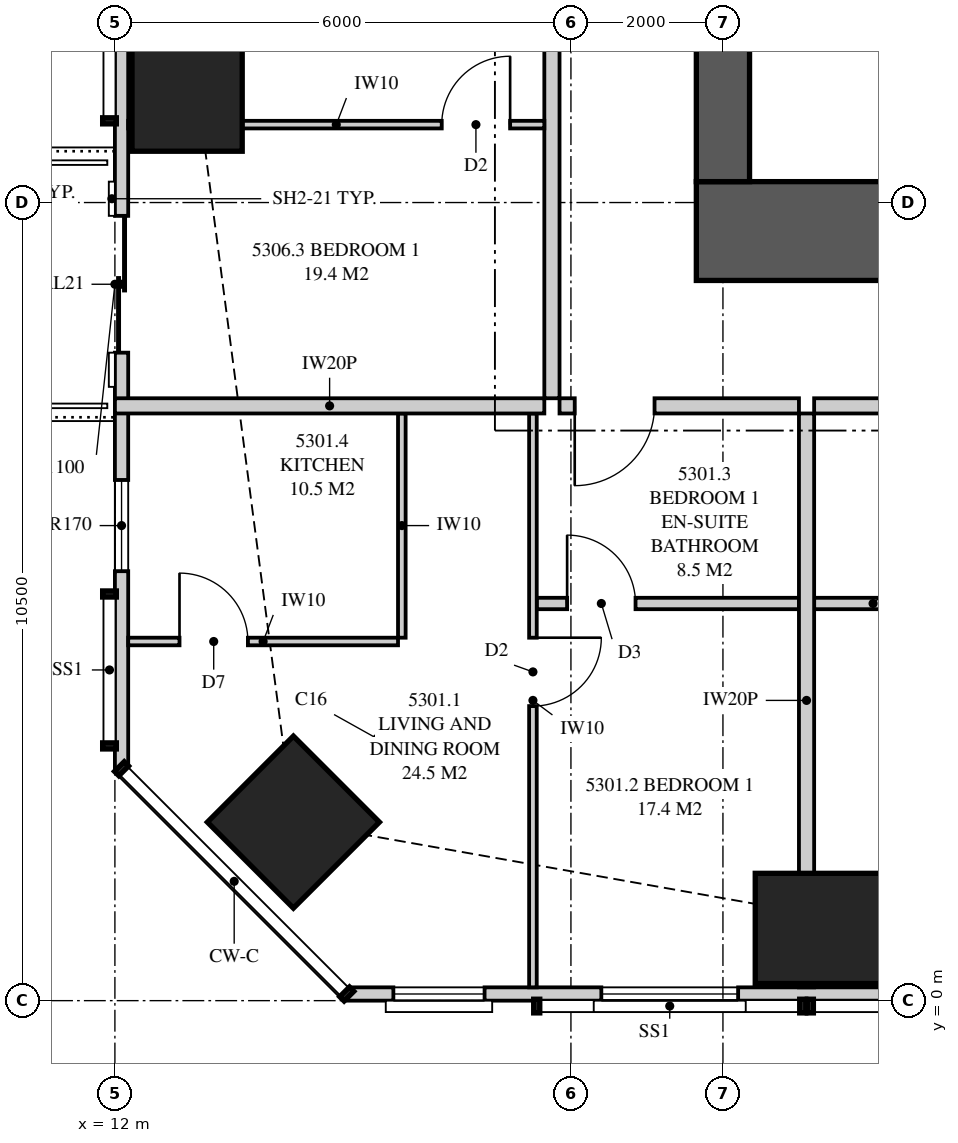
"""IFC4 building model, lengths in metres.
Left out: names, types, materials, properties, quantities, classifications, styles, units other than length and angle.
Written with IfcOpenShell. Run it as: python <this file> out.ifc"""

import sys

from ifc_helpers import new_model, si_unit, direction, frame, frame_2d, origin, origin_2d, place, context, subcontext, project, spatial, polyline, rectangle, outline, extrude, element, fill, save


model = new_model("IFC4")
c1 = context("Model", 3, precision=1e-05, world=origin(), true_north=direction((0.0, 1.0)))
c2 = subcontext(c1, "Body", "Model", "MODEL_VIEW")
j1 = project(units=[si_unit("LENGTHUNIT", "METRE"), si_unit("PLANEANGLEUNIT", "RADIAN")], contexts=[c1])
p1 = place(None, origin())
s1 = spatial("IfcSite", under=j1, at=p1, CompositionType="ELEMENT")
p2 = place(p1, origin())
s2 = spatial("IfcBuilding", under=s1, at=p2, CompositionType="ELEMENT")
p3 = place(p2, frame((0.0, 0.0, 194.55)))
s3 = spatial("IfcBuildingStorey", under=s2, at=p3, CompositionType="ELEMENT", Elevation=194.55)
p4 = place(p3, frame((14.348, 2.348, 0.0), z_axis=(0.0, 0.0, 1.0), x_axis=(0.707106781187, 0.707106781187, 0.0)))
e1 = element("IfcColumn", 1, at=p4, inside=s3, PredefinedType="COLUMN", context=c2, shape_type="SweptSolid", body=[
    extrude(rectangle(XDim=1.6, YDim=1.6, at=origin_2d()), origin(), (0.0, 0.0, 1.0), 3.35),
])
for number, where, z_axis, x_axis in (
    (2, (22.25, 0.95, 0.0), (0.0, 0.0, 1.0), (0.0, 1.0, 0.0)),
    (3, (12.95, 13.0, 0.0), (0.0, 0.0, 1.0), (1.0, 0.0, 0.0)),
):
    element("IfcColumn", number, at=place(p3, frame(where, z_axis=z_axis, x_axis=x_axis)), inside=s3, PredefinedType="COLUMN", context=c2, shape_type="SweptSolid", body=[
        extrude(rectangle(XDim=1.45, YDim=3.65, at=origin_2d()), origin(), (0.0, 0.0, 1.0), 3.35),
    ])
p5 = place(p3, frame((19.65, 10.125, 0.0), z_axis=(0.0, 0.0, 1.0), x_axis=(1.0, 0.0, 0.0)))
e4 = element("IfcWall", 4, at=p5, inside=s3, PredefinedType="SHEAR", context=c2, shape_type="SweptSolid", body=[
    extrude(rectangle(XDim=6.35, YDim=1.3, at=frame_2d((3.175, 0.0))), origin(), (0.0, 0.0, 1.0), 3.35),
])
p6 = place(p5, frame((4.775, 0.0, 0.0)))
e5 = element("IfcOpeningElement", 5, at=p6, cuts=e4, PredefinedType="OPENING", context=c2, shape_type="SweptSolid", body=[
    extrude(rectangle(XDim=0.75, YDim=2.1, at=frame_2d((0.375, 1.05))), frame((0.0, 0.66, 0.0), z_axis=(0.0, -1.0, 0.0), x_axis=(1.0, 0.0, 0.0)), (0.0, 0.0, 1.0), 1.32),
])
p7 = place(p3, frame((20.0, 13.0, 0.0), z_axis=(0.0, 0.0, 1.0), x_axis=(0.0, -1.0, 0.0)))
e6 = element("IfcWall", 6, at=p7, inside=s3, PredefinedType="SHEAR", context=c2, shape_type="SweptSolid", body=[
    extrude(rectangle(XDim=2.225, YDim=0.7, at=frame_2d((1.113, 0.0))), origin(), (0.0, 0.0, 1.0), 3.35),
])
p8 = place(p3, frame((15.051, 0.087, 0.0), z_axis=(0.0, 0.0, 1.0), x_axis=(1.0, 0.0, 0.0)))
e7 = element("IfcWall", 7, at=p8, inside=s3, PredefinedType="SOLIDWALL", context=c2, shape_type="SweptSolid", body=[
    extrude(outline(polyline([(0.0, 0.0), (34.897, 0.0), (34.897, 3.11), (27.91, 3.11), (27.91, 2.15), (27.836, 2.15), (27.836, 3.11), (27.699, 3.11), (27.699, 2.15), (7.199, 2.15), (7.199, 3.11), (7.062, 3.11), (7.062, 2.15), (6.987, 2.15), (6.987, 3.11), (0.0, 3.11), (0.0, 0.0)])), frame((0.0, 0.087, 0.0), z_axis=(0.0, -1.0, 0.0), x_axis=(1.0, 0.0, 0.0)), (0.0, 0.0, 1.0), 0.175),
])
p9 = place(p8, frame((0.613, 0.0, 0.4)))
e8 = element("IfcOpeningElement", 8, at=p9, cuts=e7, PredefinedType="OPENING", context=c2, shape_type="SweptSolid", body=[
    extrude(rectangle(XDim=1.2, YDim=1.7, at=frame_2d((0.6, 0.85))), frame((0.0, 0.097, 0.0), z_axis=(0.0, -1.0, 0.0), x_axis=(1.0, 0.0, 0.0)), (0.0, 0.0, 1.0), 0.195),
])
p10 = place(p8, frame((3.349, 0.0, 0.4)))
e9 = element("IfcOpeningElement", 9, at=p10, cuts=e7, PredefinedType="OPENING", context=c2, shape_type="SweptSolid", body=[
    extrude(rectangle(XDim=1.8, YDim=1.7, at=frame_2d((0.9, 0.85))), frame((0.0, 0.097, 0.0), z_axis=(0.0, -1.0, 0.0), x_axis=(1.0, 0.0, 0.0)), (0.0, 0.0, 1.0), 0.195),
])
p11 = place(p8, frame((9.13, 0.0, 0.4)))
e10 = element("IfcOpeningElement", 10, at=p11, cuts=e7, PredefinedType="OPENING", context=c2, shape_type="SweptSolid", body=[
    extrude(rectangle(XDim=1.8, YDim=1.7, at=frame_2d((0.9, 0.85))), frame((0.0, 0.097, 0.0), z_axis=(0.0, -1.0, 0.0), x_axis=(1.0, 0.0, 0.0)), (0.0, 0.0, 1.0), 0.195),
])
p12 = place(p8, frame((13.561, 0.0, 0.0)))
e11 = element("IfcOpeningElement", 11, at=p12, cuts=e7, PredefinedType="OPENING", context=c2, shape_type="SweptSolid", body=[
    extrude(rectangle(XDim=1.8, YDim=2.1, at=frame_2d((0.9, 1.05))), frame((0.0, 0.097, 0.0), z_axis=(0.0, -1.0, 0.0), x_axis=(1.0, 0.0, 0.0)), (0.0, 0.0, 1.0), 0.195),
])
p13 = place(p8, frame((11.799, 0.0, 0.4)))
e12 = element("IfcOpeningElement", 12, at=p13, cuts=e7, PredefinedType="OPENING", context=c2, shape_type="SweptSolid", body=[
    extrude(rectangle(XDim=1.2, YDim=1.7, at=frame_2d((0.6, 0.85))), frame((0.0, 0.097, 0.0), z_axis=(0.0, -1.0, 0.0), x_axis=(1.0, 0.0, 0.0)), (0.0, 0.0, 1.0), 0.195),
])
p14 = place(p8, frame((19.949, 0.0, 0.4)))
e13 = element("IfcOpeningElement", 13, at=p14, cuts=e7, PredefinedType="OPENING", context=c2, shape_type="SweptSolid", body=[
    extrude(rectangle(XDim=1.8, YDim=1.7, at=frame_2d((0.9, 0.85))), frame((0.0, 0.097, 0.0), z_axis=(0.0, -1.0, 0.0), x_axis=(1.0, 0.0, 0.0)), (0.0, 0.0, 1.0), 0.195),
])
p15 = place(p8, frame((23.549, 0.0, 0.4)))
e14 = element("IfcOpeningElement", 14, at=p15, cuts=e7, PredefinedType="OPENING", context=c2, shape_type="SweptSolid", body=[
    extrude(rectangle(XDim=1.8, YDim=1.7, at=frame_2d((0.9, 0.85))), frame((0.0, 0.097, 0.0), z_axis=(0.0, -1.0, 0.0), x_axis=(1.0, 0.0, 0.0)), (0.0, 0.0, 1.0), 0.195),
])
p16 = place(p8, frame((29.73, 0.0, 0.4)))
e15 = element("IfcOpeningElement", 15, at=p16, cuts=e7, PredefinedType="OPENING", context=c2, shape_type="SweptSolid", body=[
    extrude(rectangle(XDim=2.4, YDim=1.7, at=frame_2d((1.2, 0.85))), frame((0.0, 0.097, 0.0), z_axis=(0.0, -1.0, 0.0), x_axis=(1.0, 0.0, 0.0)), (0.0, 0.0, 1.0), 0.195),
])
p17 = place(p3, frame((12.087, 32.949, 0.0), z_axis=(0.0, 0.0, 1.0), x_axis=(0.0, -1.0, 0.0)))
e16 = element("IfcWall", 16, at=p17, inside=s3, PredefinedType="SOLIDWALL", context=c2, shape_type="SweptSolid", body=[
    extrude(outline(polyline([(0.0, 0.0), (29.897, 0.0), (29.897, 3.11), (20.191, 3.11), (20.191, 2.15), (20.051, 2.15), (20.051, 3.11), (19.949, 3.11), (19.949, 2.15), (7.949, 2.15), (7.949, 3.11), (7.823, 3.11), (7.823, 2.15), (7.73, 2.15), (7.73, 3.11), (0.0, 3.11), (0.0, 0.0)])), frame((0.0, 0.087, 0.0), z_axis=(0.0, -1.0, 0.0), x_axis=(1.0, 0.0, 0.0)), (0.0, 0.0, 1.0), 0.175),
])
p18 = place(p17, frame((1.226, 0.0, 0.4)))
e17 = element("IfcOpeningElement", 17, at=p18, cuts=e16, PredefinedType="OPENING", context=c2, shape_type="SweptSolid", body=[
    extrude(rectangle(XDim=1.8, YDim=1.7, at=frame_2d((0.9, 0.85))), frame((0.0, 0.097, 0.0), z_axis=(0.0, -1.0, 0.0), x_axis=(1.0, 0.0, 0.0)), (0.0, 0.0, 1.0), 0.195),
])
p19 = place(p17, frame((9.899, 0.0, 0.4)))
e18 = element("IfcOpeningElement", 18, at=p19, cuts=e16, PredefinedType="OPENING", context=c2, shape_type="SweptSolid", body=[
    extrude(rectangle(XDim=1.8, YDim=1.7, at=frame_2d((0.9, 0.85))), frame((0.0, 0.097, 0.0), z_axis=(0.0, -1.0, 0.0), x_axis=(1.0, 0.0, 0.0)), (0.0, 0.0, 1.0), 0.195),
])
p20 = place(p17, frame((13.024, 0.0, 0.4)))
e19 = element("IfcOpeningElement", 19, at=p20, cuts=e16, PredefinedType="OPENING", context=c2, shape_type="SweptSolid", body=[
    extrude(rectangle(XDim=1.8, YDim=1.7, at=frame_2d((0.9, 0.85))), frame((0.0, 0.097, 0.0), z_axis=(0.0, -1.0, 0.0), x_axis=(1.0, 0.0, 0.0)), (0.0, 0.0, 1.0), 0.195),
])
p21 = place(p17, frame((16.201, 0.0, 0.4)))
e20 = element("IfcOpeningElement", 20, at=p21, cuts=e16, PredefinedType="OPENING", context=c2, shape_type="SweptSolid", body=[
    extrude(rectangle(XDim=1.8, YDim=1.7, at=frame_2d((0.9, 0.85))), frame((0.0, 0.097, 0.0), z_axis=(0.0, -1.0, 0.0), x_axis=(1.0, 0.0, 0.0)), (0.0, 0.0, 1.0), 0.195),
])
p22 = place(p17, frame((22.624, 0.0, 0.0)))
e21 = element("IfcOpeningElement", 21, at=p22, cuts=e16, PredefinedType="OPENING", context=c2, shape_type="SweptSolid", body=[
    extrude(rectangle(XDim=1.8, YDim=2.1, at=frame_2d((0.9, 1.05))), frame((0.0, 0.097, 0.0), z_axis=(0.0, -1.0, 0.0), x_axis=(1.0, 0.0, 0.0)), (0.0, 0.0, 1.0), 0.195),
])
p23 = place(p17, frame((26.099, 0.0, 0.4)))
e22 = element("IfcOpeningElement", 22, at=p23, cuts=e16, PredefinedType="OPENING", context=c2, shape_type="SweptSolid", body=[
    extrude(rectangle(XDim=1.2, YDim=1.7, at=frame_2d((0.6, 0.85))), frame((0.0, 0.097, 0.0), z_axis=(0.0, -1.0, 0.0), x_axis=(1.0, 0.0, 0.0)), (0.0, 0.0, 1.0), 0.195),
])
p24 = place(p3, frame((21.1, 0.175, 0.0), z_axis=(0.0, 0.0, 1.0), x_axis=(0.0, 1.0, 0.0)))
e23 = element("IfcWall", 23, at=p24, inside=s3, PredefinedType="PARTITIONING", context=c2, shape_type="SweptSolid", body=[
    extrude(outline(polyline([(0.054, 3.11), (0.0, 3.11), (0.0, 0.0), (0.529, 0.0), (0.529, 0.362), (1.021, 0.362), (1.021, 0.0), (7.55, 0.0), (7.55, 3.11), (1.903, 3.11), (1.903, 2.15), (1.021, 2.15), (1.021, 1.788), (0.529, 1.788), (0.529, 2.15), (0.054, 2.15), (0.054, 3.11)])), frame((0.0, 0.1, 0.0), z_axis=(0.0, -1.0, 0.0), x_axis=(1.0, 0.0, 0.0)), (0.0, 0.0, 1.0), 0.2),
])
p25 = place(p3, frame((17.85, 7.825, 0.0), z_axis=(0.0, 0.0, 1.0), x_axis=(1.0, 0.0, 0.0)))
e24 = element("IfcWall", 24, at=p25, inside=s3, PredefinedType="PARTITIONING", context=c2, shape_type="SweptSolid", body=[
    extrude(rectangle(XDim=3.15, YDim=0.2, at=frame_2d((1.575, 0.0))), origin(), (0.0, 0.0, 1.0), 3.11),
])
p26 = place(p25, frame((0.2, 0.0, 0.0)))
e25 = element("IfcOpeningElement", 25, at=p26, cuts=e24, PredefinedType="OPENING", context=c2, shape_type="SweptSolid", body=[
    extrude(rectangle(XDim=1.05, YDim=2.2, at=frame_2d((0.525, 1.1))), frame((0.0, 0.11, 0.0), z_axis=(0.0, -1.0, 0.0), x_axis=(1.0, 0.0, 0.0)), (0.0, 0.0, 1.0), 0.22),
])
p27 = place(p3, frame((17.5, 0.175, 0.0), z_axis=(0.0, 0.0, 1.0), x_axis=(0.0, 1.0, 0.0)))
e26 = element("IfcWall", 26, at=p27, inside=s3, PredefinedType="PARTITIONING", context=c2, shape_type="SweptSolid", body=[
    extrude(outline(polyline([(0.0, 0.0), (7.55, 0.0), (7.55, 3.11), (2.489, 3.11), (2.489, 2.15), (0.742, 2.15), (0.742, 3.11), (0.0, 3.11), (0.0, 0.0)])), frame((0.0, 0.05, 0.0), z_axis=(0.0, -1.0, 0.0), x_axis=(1.0, 0.0, 0.0)), (0.0, 0.0, 1.0), 0.1),
])
p28 = place(p27, frame((3.7, 0.0, 0.0)))
e27 = element("IfcOpeningElement", 27, at=p28, cuts=e26, PredefinedType="OPENING", context=c2, shape_type="SweptSolid", body=[
    extrude(rectangle(XDim=0.9, YDim=2.1, at=frame_2d((0.45, 1.05))), frame((0.0, 0.06, 0.0), z_axis=(0.0, -1.0, 0.0), x_axis=(1.0, 0.0, 0.0)), (0.0, 0.0, 1.0), 0.12),
])
p29 = place(p3, frame((17.55, 5.225, 0.0), z_axis=(0.0, 0.0, 1.0), x_axis=(1.0, 0.0, 0.0)))
e28 = element("IfcWall", 28, at=p29, inside=s3, PredefinedType="PLUMBINGWALL", context=c2, shape_type="SweptSolid", body=[
    extrude(rectangle(XDim=3.45, YDim=0.15, at=frame_2d((1.725, 0.0))), origin(), (0.0, 0.0, 1.0), 3.11),
])
p30 = place(p29, frame((0.4, 0.0, 0.0)))
e29 = element("IfcOpeningElement", 29, at=p30, cuts=e28, PredefinedType="OPENING", context=c2, shape_type="SweptSolid", body=[
    extrude(rectangle(XDim=0.9, YDim=2.1, at=frame_2d((0.45, 1.05))), frame((0.0, 0.085, 0.0), z_axis=(0.0, -1.0, 0.0), x_axis=(1.0, 0.0, 0.0)), (0.0, 0.0, 1.0), 0.17),
])
p31 = place(p3, frame((12.175, 4.725, 0.0), z_axis=(0.0, 0.0, 1.0), x_axis=(1.0, 0.0, 0.0)))
e30 = element("IfcWall", 30, at=p31, inside=s3, PredefinedType="PARTITIONING", context=c2, shape_type="SweptSolid", body=[
    extrude(outline(polyline([(0.0, 0.0), (3.55, 0.0), (3.55, 3.11), (2.729, 3.11), (2.729, 2.15), (0.994, 2.15), (0.994, 3.11), (0.0, 3.11), (0.0, 0.0)])), frame((0.0, 0.05, 0.0), z_axis=(0.0, -1.0, 0.0), x_axis=(1.0, 0.0, 0.0)), (0.0, 0.0, 1.0), 0.1),
])
p32 = place(p31, frame((0.675, 0.0, 0.0)))
e31 = element("IfcOpeningElement", 31, at=p32, cuts=e30, PredefinedType="OPENING", context=c2, shape_type="SweptSolid", body=[
    extrude(rectangle(XDim=0.9, YDim=2.1, at=frame_2d((0.45, 1.05))), frame((0.0, 0.06, 0.0), z_axis=(0.0, -1.0, 0.0), x_axis=(1.0, 0.0, 0.0)), (0.0, 0.0, 1.0), 0.12),
])
p33 = place(p3, frame((15.775, 4.775, 0.0), z_axis=(0.0, 0.0, 1.0), x_axis=(0.0, 1.0, 0.0)))
e32 = element("IfcWall", 32, at=p33, inside=s3, PredefinedType="PARTITIONING", context=c2, shape_type="SweptSolid", body=[
    extrude(rectangle(XDim=2.95, YDim=0.1, at=frame_2d((1.475, 0.0))), origin(), (0.0, 0.0, 1.0), 3.11),
])
p34 = place(p3, frame((21.2, 7.825, 0.0), z_axis=(0.0, 0.0, 1.0), x_axis=(1.0, 0.0, 0.0)))
e33 = element("IfcWall", 33, at=p34, inside=s3, PredefinedType="PARTITIONING", context=c2, shape_type="SweptSolid", body=[
    extrude(outline(polyline([(0.0, 0.0), (8.6, 0.0), (8.6, 3.11), (1.387, 3.11), (1.387, 2.541), (0.713, 2.541), (0.713, 3.11), (0.0, 3.11), (0.0, 0.0)])), frame((0.0, 0.1, 0.0), z_axis=(0.0, -1.0, 0.0), x_axis=(1.0, 0.0, 0.0)), (0.0, 0.0, 1.0), 0.2),
])
p35 = place(p3, frame((21.2, 5.225, 0.0), z_axis=(0.0, 0.0, 1.0), x_axis=(1.0, 0.0, 0.0)))
e34 = element("IfcWall", 34, at=p35, inside=s3, PredefinedType="PLUMBINGWALL", context=c2, shape_type="SweptSolid", body=[
    extrude(outline(polyline([(0.0, 0.0), (5.2, 0.0), (5.2, 3.11), (1.362, 3.11), (1.362, 2.541), (0.738, 2.541), (0.738, 3.11), (0.0, 3.11), (0.0, 0.0)])), frame((0.0, 0.075, 0.0), z_axis=(0.0, -1.0, 0.0), x_axis=(1.0, 0.0, 0.0)), (0.0, 0.0, 1.0), 0.15),
])
p36 = place(p3, frame((12.0, 7.825, 0.0), z_axis=(0.0, 0.0, 1.0), x_axis=(1.0, 0.0, 0.0)))
e35 = element("IfcWall", 35, at=p36, inside=s3, PredefinedType="PARTITIONING", context=c2, shape_type="SweptSolid", body=[
    extrude(outline(polyline([(0.0, 0.0), (5.65, 0.0), (5.65, 3.11), (2.547, 3.11), (2.547, 2.15), (0.712, 2.15), (0.712, 3.11), (0.0, 3.11), (0.0, 0.0)])), frame((0.0, 0.1, 0.0), z_axis=(0.0, -1.0, 0.0), x_axis=(1.0, 0.0, 0.0)), (0.0, 0.0, 1.0), 0.2),
])
p37 = place(p3, frame((17.75, 7.925, 0.0), z_axis=(0.0, 0.0, 1.0), x_axis=(0.0, 1.0, 0.0)))
e36 = element("IfcWall", 36, at=p37, inside=s3, PredefinedType="PARTITIONING", context=c2, shape_type="SweptSolid", body=[
    extrude(outline(polyline([(0.0, 0.0), (21.15, 0.0), (21.15, 3.11), (17.412, 3.11), (17.412, 2.541), (16.738, 2.541), (16.738, 3.11), (5.412, 3.11), (5.412, 2.541), (4.738, 2.541), (4.738, 3.11), (0.0, 3.11), (0.0, 0.0)])), frame((0.0, 0.1, 0.0), z_axis=(0.0, -1.0, 0.0), x_axis=(1.0, 0.0, 0.0)), (0.0, 0.0, 1.0), 0.2),
])
p38 = place(p37, frame((16.25, 0.0, 0.0)))
e37 = element("IfcOpeningElement", 37, at=p38, cuts=e36, PredefinedType="OPENING", context=c2, shape_type="SweptSolid", body=[
    extrude(rectangle(XDim=1.05, YDim=2.2, at=frame_2d((0.525, 1.1))), frame((0.0, 0.11, 0.0), z_axis=(0.0, -1.0, 0.0), x_axis=(1.0, 0.0, 0.0)), (0.0, 0.0, 1.0), 0.22),
])
p39 = place(p3, frame((12.175, 11.525, 0.0), z_axis=(0.0, 0.0, 1.0), x_axis=(1.0, 0.0, 0.0)))
e38 = element("IfcWall", 38, at=p39, inside=s3, PredefinedType="PARTITIONING", context=c2, shape_type="SweptSolid", body=[
    extrude(outline(polyline([(0.0, 0.0), (5.475, 0.0), (5.475, 3.11), (1.836, 3.11), (1.836, 2.15), (0.101, 2.15), (0.101, 3.11), (0.0, 3.11), (0.0, 0.0)])), frame((0.0, 0.05, 0.0), z_axis=(0.0, -1.0, 0.0), x_axis=(1.0, 0.0, 0.0)), (0.0, 0.0, 1.0), 0.1),
])
p40 = place(p39, frame((4.125, 0.0, 0.0)))
e39 = element("IfcOpeningElement", 39, at=p40, cuts=e38, PredefinedType="OPENING", context=c2, shape_type="SweptSolid", body=[
    extrude(rectangle(XDim=0.9, YDim=2.1, at=frame_2d((0.45, 1.05))), frame((0.0, 0.06, 0.0), z_axis=(0.0, -1.0, 0.0), x_axis=(1.0, 0.0, 0.0)), (0.0, 0.0, 1.0), 0.12),
])
p41 = place(p9, origin())
e40 = element("IfcWindow", 40, at=p41, inside=s3, PartitioningType="SINGLE_PANEL", PredefinedType="WINDOW", context=c2, shape_type="SweptSolid", body=[
    extrude(rectangle(XDim=1.2, YDim=1.7, at=frame_2d((0.6, 0.85))), frame((0.0, 0.03, 0.0), z_axis=(0.0, -1.0, 0.0), x_axis=(1.0, 0.0, 0.0)), (0.0, 0.0, 1.0), 0.06),
])
fill(e8, e40)
p42 = place(p10, origin())
e41 = element("IfcWindow", 41, at=p42, inside=s3, PartitioningType="SINGLE_PANEL", PredefinedType="WINDOW", context=c2, shape_type="SweptSolid", body=[
    extrude(rectangle(XDim=1.8, YDim=1.7, at=frame_2d((0.9, 0.85))), frame((0.0, 0.03, 0.0), z_axis=(0.0, -1.0, 0.0), x_axis=(1.0, 0.0, 0.0)), (0.0, 0.0, 1.0), 0.06),
])
fill(e9, e41)
p43 = place(p22, origin())
e42 = element("IfcDoor", 42, at=p43, inside=s3, OperationType="SLIDING_TO_LEFT", PredefinedType="DOOR", context=c2, shape_type="SweptSolid", body=[
    extrude(rectangle(XDim=1.8, YDim=2.1, at=frame_2d((0.9, 1.05))), frame((0.0, 0.025, 0.0), z_axis=(0.0, -1.0, 0.0), x_axis=(1.0, 0.0, 0.0)), (0.0, 0.0, 1.0), 0.05),
])
fill(e21, e42)
p44 = place(p23, origin())
e43 = element("IfcWindow", 43, at=p44, inside=s3, PartitioningType="SINGLE_PANEL", PredefinedType="WINDOW", context=c2, shape_type="SweptSolid", body=[
    extrude(rectangle(XDim=1.2, YDim=1.7, at=frame_2d((0.6, 0.85))), frame((0.0, 0.03, 0.0), z_axis=(0.0, -1.0, 0.0), x_axis=(1.0, 0.0, 0.0)), (0.0, 0.0, 1.0), 0.06),
])
fill(e22, e43)
p45 = place(p26, frame((1.05, 0.0, 0.0), z_axis=(0.0, 0.0, 1.0), x_axis=(-1.0, 0.0, 0.0)))
e44 = element("IfcDoor", 44, at=p45, inside=s3, OperationType="SINGLE_SWING_RIGHT", PredefinedType="DOOR", context=c2, shape_type="SweptSolid", body=[
    extrude(rectangle(XDim=1.05, YDim=2.2, at=frame_2d((0.525, 1.1))), frame((0.0, 0.025, 0.0), z_axis=(0.0, -1.0, 0.0), x_axis=(1.0, 0.0, 0.0)), (0.0, 0.0, 1.0), 0.05),
])
fill(e25, e44)
p46 = place(p28, frame((0.9, 0.0, 0.0), z_axis=(0.0, 0.0, 1.0), x_axis=(-1.0, 0.0, 0.0)))
e45 = element("IfcDoor", 45, at=p46, inside=s3, OperationType="SINGLE_SWING_LEFT", PredefinedType="DOOR", context=c2, shape_type="SweptSolid", body=[
    extrude(rectangle(XDim=0.9, YDim=2.1, at=frame_2d((0.45, 1.05))), frame((0.0, 0.025, 0.0), z_axis=(0.0, -1.0, 0.0), x_axis=(1.0, 0.0, 0.0)), (0.0, 0.0, 1.0), 0.05),
])
fill(e27, e45)
p47 = place(p30, origin())
e46 = element("IfcDoor", 46, at=p47, inside=s3, OperationType="SINGLE_SWING_LEFT", PredefinedType="DOOR", context=c2, shape_type="SweptSolid", body=[
    extrude(rectangle(XDim=0.9, YDim=2.1, at=frame_2d((0.45, 1.05))), frame((0.0, 0.025, 0.0), z_axis=(0.0, -1.0, 0.0), x_axis=(1.0, 0.0, 0.0)), (0.0, 0.0, 1.0), 0.05),
])
fill(e29, e46)
p48 = place(p32, origin())
e47 = element("IfcDoor", 47, at=p48, inside=s3, OperationType="SINGLE_SWING_LEFT", PredefinedType="DOOR", context=c2, shape_type="SweptSolid", body=[
    extrude(rectangle(XDim=0.9, YDim=2.1, at=frame_2d((0.45, 1.05))), frame((0.0, 0.025, 0.0), z_axis=(0.0, -1.0, 0.0), x_axis=(1.0, 0.0, 0.0)), (0.0, 0.0, 1.0), 0.05),
])
fill(e31, e47)
p49 = place(p40, origin())
e48 = element("IfcDoor", 48, at=p49, inside=s3, OperationType="SINGLE_SWING_RIGHT", PredefinedType="DOOR", context=c2, shape_type="SweptSolid", body=[
    extrude(rectangle(XDim=0.9, YDim=2.1, at=frame_2d((0.45, 1.05))), frame((0.0, 0.025, 0.0), z_axis=(0.0, -1.0, 0.0), x_axis=(1.0, 0.0, 0.0)), (0.0, 0.0, 1.0), 0.05),
])
fill(e39, e48)
save(model, sys.argv[1])
